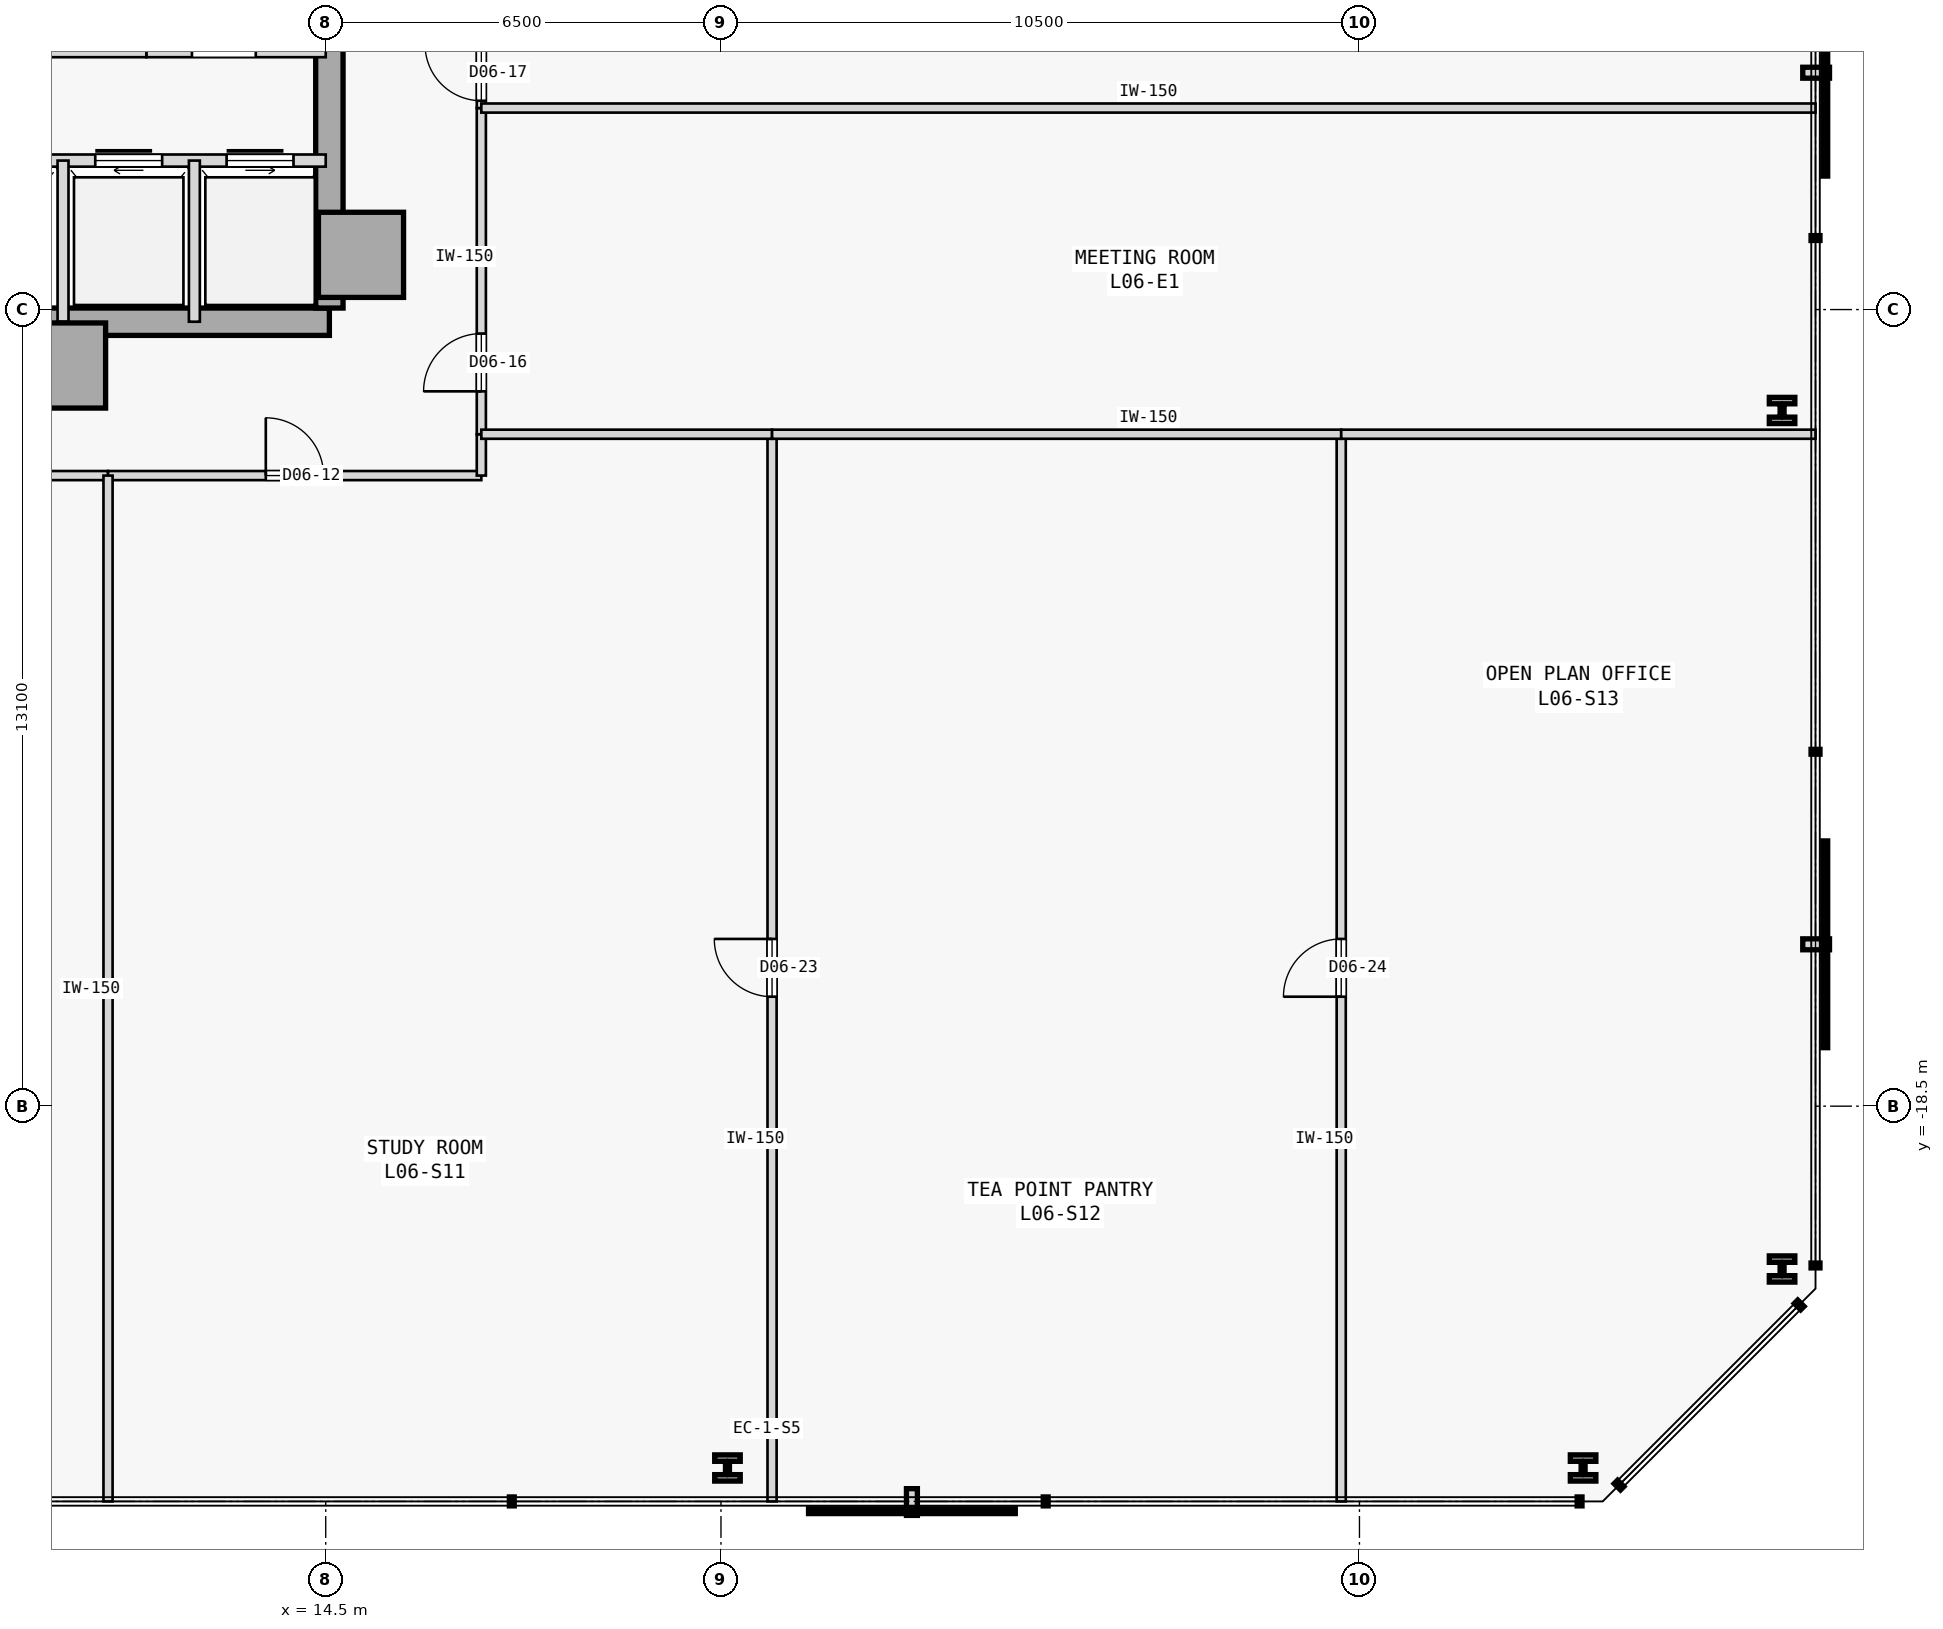
"""IFC4 building model, lengths in metres.
Left out: names, types, materials, properties, quantities, classifications, styles, units other than length and angle.
Written with IfcOpenShell. Run it as: python <this file> out.ifc"""

import sys

from ifc_helpers import new_model, si_unit, direction, frame, frame_2d, origin, origin_2d, place, context, subcontext, project, spatial, rectangle, i_section, extrude, element, fill, save


model = new_model("IFC4")
c1 = context("Model", 3, precision=1e-05, world=origin(), true_north=direction((0.0, 1.0)))
c2 = subcontext(c1, "Body", "Model", "MODEL_VIEW")
j1 = project(units=[si_unit("LENGTHUNIT", "METRE"), si_unit("PLANEANGLEUNIT", "RADIAN")], contexts=[c1])
p1 = place(None, origin())
s1 = spatial("IfcSite", under=j1, at=p1, CompositionType="ELEMENT")
p2 = place(p1, origin())
s2 = spatial("IfcBuilding", under=s1, at=p2, CompositionType="ELEMENT")
p3 = place(p2, frame((0.0, 0.0, 29.4)))
s3 = spatial("IfcBuildingStorey", under=s2, at=p3, CompositionType="ELEMENT", Elevation=29.4)
for number, where, z_axis, x_axis in (
    (1, (15.08, -4.5, 0.0), (0.0, 0.0, 1.0), (1.0, 0.0, 0.0)),
    (2, (10.18, -6.32, 0.0), (0.0, 0.0, 1.0), (1.0, 0.0, 0.0)),
):
    element("IfcColumn", number, at=place(p3, frame(where, z_axis=z_axis, x_axis=x_axis)), inside=s3, PredefinedType="COLUMN", context=c2, shape_type="SweptSolid", body=[
        extrude(rectangle(XDim=1.4, YDim=1.4, at=origin_2d()), origin(), (0.0, 0.0, 1.0), 3.8),
    ])
p4 = place(p3, frame((3.7, -5.6, 0.0), z_axis=(0.0, 0.0, 1.0), x_axis=(1.0, 0.0, 0.0)))
e3 = element("IfcWall", 3, at=p4, inside=s3, PredefinedType="SHEAR", context=c2, shape_type="SweptSolid", body=[
    extrude(rectangle(XDim=10.86, YDim=0.45, at=frame_2d((5.43, 0.0))), origin(), (0.0, 0.0, 1.0), 3.575),
])
p5 = place(p3, frame((14.56, -5.375, 0.0), z_axis=(0.0, 0.0, 1.0), x_axis=(0.0, 1.0, 0.0)))
e4 = element("IfcWall", 4, at=p5, inside=s3, PredefinedType="SHEAR", context=c2, shape_type="SweptSolid", body=[
    extrude(rectangle(XDim=10.75, YDim=0.45, at=frame_2d((5.375, 0.0))), origin(), (0.0, 0.0, 1.0), 3.575),
])
for number, where, z_axis, x_axis in (
    (5, (21.107, -24.45, 0.0), (0.0, 0.0, 1.0), (1.0, 0.0, 0.0)),
    (6, (35.178, -24.45, 0.0), (0.0, 0.0, 1.0), (1.0, 0.0, 0.0)),
    (7, (38.45, -21.178, 0.0), (0.0, 0.0, 1.0), (1.0, 0.0, 0.0)),
    (8, (38.45, -7.059, 0.0), (0.0, 0.0, 1.0), (1.0, 0.0, 0.0)),
):
    element("IfcColumn", number, at=place(p3, frame(where, z_axis=z_axis, x_axis=x_axis)), inside=s3, PredefinedType="COLUMN", context=c2, shape_type="SweptSolid", body=[
        extrude(i_section(OverallWidth=0.42, OverallDepth=0.431, WebThickness=0.065, FlangeThickness=0.106, FilletRadius=0.015, at=origin_2d()), origin(), (0.0, 0.0, 1.0), 3.8),
    ])
p6 = place(p3, frame((11.55, -1.15, 0.0), z_axis=(0.0, 0.0, 1.0), x_axis=(1.0, 0.0, 0.0)))
e9 = element("IfcWall", 9, at=p6, inside=s3, PredefinedType="STANDARD", context=c2, shape_type="SweptSolid", body=[
    extrude(rectangle(XDim=2.95, YDim=0.2, at=frame_2d((1.475, 0.0))), origin(), (0.0, 0.0, 1.0), 3.575),
])
p7 = place(p6, frame((0.75, 0.0, 0.0)))
e10 = element("IfcOpeningElement", 10, at=p7, cuts=e9, PredefinedType="OPENING", context=c2, shape_type="SweptSolid", body=[
    extrude(rectangle(XDim=1.05, YDim=2.18, at=frame_2d((0.525, 1.09))), frame((0.0, 0.11, 0.0), z_axis=(0.0, -1.0, 0.0), x_axis=(1.0, 0.0, 0.0)), (0.0, 0.0, 1.0), 0.22),
])
p8 = place(p3, frame((9.35, -1.15, 0.0), z_axis=(0.0, 0.0, 1.0), x_axis=(1.0, 0.0, 0.0)))
e11 = element("IfcWall", 11, at=p8, inside=s3, PredefinedType="STANDARD", context=c2, shape_type="SweptSolid", body=[
    extrude(rectangle(XDim=2.2, YDim=0.2, at=frame_2d((1.1, 0.0))), origin(), (0.0, 0.0, 1.0), 3.575),
])
p9 = place(p3, frame((3.7, -2.95, 0.0), z_axis=(0.0, 0.0, 1.0), x_axis=(1.0, 0.0, 0.0)))
e12 = element("IfcWall", 12, at=p9, inside=s3, PredefinedType="STANDARD", context=c2, shape_type="SweptSolid", body=[
    extrude(rectangle(XDim=10.8, YDim=0.2, at=frame_2d((5.4, 0.0))), origin(), (0.0, 0.0, 1.0), 3.575),
])
p10 = place(p9, frame((7.01, 0.0, 0.0)))
e13 = element("IfcOpeningElement", 13, at=p10, cuts=e12, PredefinedType="OPENING", context=c2, shape_type="SweptSolid", body=[
    extrude(rectangle(XDim=1.1, YDim=2.15, at=frame_2d((0.55, 1.075))), frame((0.0, 0.11, 0.0), z_axis=(0.0, -1.0, 0.0), x_axis=(1.0, 0.0, 0.0)), (0.0, 0.0, 1.0), 0.22),
])
p11 = place(p9, frame((9.17, 0.0, 0.0)))
e14 = element("IfcOpeningElement", 14, at=p11, cuts=e12, PredefinedType="OPENING", context=c2, shape_type="SweptSolid", body=[
    extrude(rectangle(XDim=1.1, YDim=2.15, at=frame_2d((0.55, 1.075))), frame((0.0, 0.11, 0.0), z_axis=(0.0, -1.0, 0.0), x_axis=(1.0, 0.0, 0.0)), (0.0, 0.0, 1.0), 0.22),
])
for number, where, z_axis, x_axis in (
    (15, (12.34, -5.6, 0.0), (0.0, 0.0, 1.0), (0.0, 1.0, 0.0)),
    (16, (10.18, -5.6, 0.0), (0.0, 0.0, 1.0), (0.0, 1.0, 0.0)),
):
    element("IfcWall", number, at=place(p3, frame(where, z_axis=z_axis, x_axis=x_axis)), inside=s3, PredefinedType="STANDARD", context=c2, shape_type="SweptSolid", body=[
        extrude(rectangle(XDim=2.65, YDim=0.18, at=frame_2d((1.325, 0.0))), origin(), (0.0, 0.0, 1.0), 3.575),
    ])
p12 = place(p3, frame((0.92, -8.13, 0.0), z_axis=(0.0, 0.0, 1.0), x_axis=(1.0, 0.0, 0.0)))
e17 = element("IfcWall", 17, at=p12, inside=s3, PredefinedType="PARTITIONING", context=c2, shape_type="SweptSolid", body=[
    extrude(rectangle(XDim=10.0, YDim=0.15, at=frame_2d((5.0, 0.0))), origin(), (0.0, 0.0, 1.0), 3.575),
])
p13 = place(p3, frame((10.92, -8.13, 0.0), z_axis=(0.0, 0.0, 1.0), x_axis=(1.0, 0.0, 0.0)))
e18 = element("IfcWall", 18, at=p13, inside=s3, PredefinedType="PARTITIONING", context=c2, shape_type="SweptSolid", body=[
    extrude(rectangle(XDim=6.139, YDim=0.15, at=frame_2d((3.07, 0.0))), origin(), (0.0, 0.0, 1.0), 3.575),
])
p14 = place(p13, frame((2.594, 0.0, 0.0)))
e19 = element("IfcOpeningElement", 19, at=p14, cuts=e18, PredefinedType="OPENING", context=c2, shape_type="SweptSolid", body=[
    extrude(rectangle(XDim=0.95, YDim=2.15, at=frame_2d((0.475, 1.075))), frame((0.0, 0.085, 0.0), z_axis=(0.0, -1.0, 0.0), x_axis=(1.0, 0.0, 0.0)), (0.0, 0.0, 1.0), 0.17),
])
p15 = place(p3, frame((17.059, -8.13, 0.0), z_axis=(0.0, 0.0, 1.0), x_axis=(0.0, 1.0, 0.0)))
e20 = element("IfcWall", 20, at=p15, inside=s3, PredefinedType="PARTITIONING", context=c2, shape_type="SweptSolid", body=[
    extrude(rectangle(XDim=0.68, YDim=0.15, at=frame_2d((0.34, 0.0))), origin(), (0.0, 0.0, 1.0), 3.575),
])
p16 = place(p3, frame((17.059, -7.45, 0.0), z_axis=(0.0, 0.0, 1.0), x_axis=(0.0, 1.0, 0.0)))
e21 = element("IfcWall", 21, at=p16, inside=s3, PredefinedType="PARTITIONING", context=c2, shape_type="SweptSolid", body=[
    extrude(rectangle(XDim=5.364, YDim=0.15, at=frame_2d((2.682, 0.0))), origin(), (0.0, 0.0, 1.0), 3.575),
])
p17 = place(p16, frame((0.705, 0.0, 0.0)))
e22 = element("IfcOpeningElement", 22, at=p17, cuts=e21, PredefinedType="OPENING", context=c2, shape_type="SweptSolid", body=[
    extrude(rectangle(XDim=0.95, YDim=2.15, at=frame_2d((0.475, 1.075))), frame((0.0, 0.085, 0.0), z_axis=(0.0, -1.0, 0.0), x_axis=(1.0, 0.0, 0.0)), (0.0, 0.0, 1.0), 0.17),
])
p18 = place(p3, frame((17.059, -2.086, 0.0), z_axis=(0.0, 0.0, 1.0), x_axis=(0.0, 1.0, 0.0)))
e23 = element("IfcWall", 23, at=p18, inside=s3, PredefinedType="PARTITIONING", context=c2, shape_type="SweptSolid", body=[
    extrude(rectangle(XDim=1.166, YDim=0.15, at=frame_2d((0.583, 0.0))), origin(), (0.0, 0.0, 1.0), 3.575),
])
p19 = place(p18, frame((0.12, 0.0, 0.0)))
e24 = element("IfcOpeningElement", 24, at=p19, cuts=e23, PredefinedType="OPENING", context=c2, shape_type="SweptSolid", body=[
    extrude(rectangle(XDim=0.926, YDim=2.15, at=frame_2d((0.463, 1.075))), frame((0.0, 0.085, 0.0), z_axis=(0.0, -1.0, 0.0), x_axis=(1.0, 0.0, 0.0)), (0.0, 0.0, 1.0), 0.17),
])
p20 = place(p3, frame((10.92, -25.0, 0.0), z_axis=(0.0, 0.0, 1.0), x_axis=(0.0, 1.0, 0.0)))
e25 = element("IfcWall", 25, at=p20, inside=s3, PredefinedType="PARTITIONING", context=c2, shape_type="SweptSolid", body=[
    extrude(rectangle(XDim=16.87, YDim=0.15, at=frame_2d((8.435, 0.0))), origin(), (0.0, 0.0, 1.0), 3.575),
])
p21 = place(p3, frame((21.84, -25.0, 0.0), z_axis=(0.0, 0.0, 1.0), x_axis=(0.0, 1.0, 0.0)))
e26 = element("IfcWall", 26, at=p21, inside=s3, PredefinedType="PARTITIONING", context=c2, shape_type="SweptSolid", body=[
    extrude(rectangle(XDim=17.55, YDim=0.15, at=frame_2d((8.775, 0.0))), origin(), (0.0, 0.0, 1.0), 3.575),
])
p22 = place(p21, frame((8.3, 0.0, 0.0)))
e27 = element("IfcOpeningElement", 27, at=p22, cuts=e26, PredefinedType="OPENING", context=c2, shape_type="SweptSolid", body=[
    extrude(rectangle(XDim=0.95, YDim=2.15, at=frame_2d((0.475, 1.075))), frame((0.0, 0.085, 0.0), z_axis=(0.0, -1.0, 0.0), x_axis=(1.0, 0.0, 0.0)), (0.0, 0.0, 1.0), 0.17),
])
p23 = place(p3, frame((17.059, -7.45, 0.0), z_axis=(0.0, 0.0, 1.0), x_axis=(1.0, 0.0, 0.0)))
e28 = element("IfcWall", 28, at=p23, inside=s3, PredefinedType="PARTITIONING", context=c2, shape_type="SweptSolid", body=[
    extrude(rectangle(XDim=4.781, YDim=0.15, at=frame_2d((2.391, 0.0))), origin(), (0.0, 0.0, 1.0), 3.575),
])
p24 = place(p3, frame((31.2, -25.0, 0.0), z_axis=(0.0, 0.0, 1.0), x_axis=(0.0, 1.0, 0.0)))
e29 = element("IfcWall", 29, at=p24, inside=s3, PredefinedType="PARTITIONING", context=c2, shape_type="SweptSolid", body=[
    extrude(rectangle(XDim=17.55, YDim=0.15, at=frame_2d((8.775, 0.0))), origin(), (0.0, 0.0, 1.0), 3.575),
])
p25 = place(p24, frame((8.3, 0.0, 0.0)))
e30 = element("IfcOpeningElement", 30, at=p25, cuts=e29, PredefinedType="OPENING", context=c2, shape_type="SweptSolid", body=[
    extrude(rectangle(XDim=0.95, YDim=2.15, at=frame_2d((0.475, 1.075))), frame((0.0, 0.085, 0.0), z_axis=(0.0, -1.0, 0.0), x_axis=(1.0, 0.0, 0.0)), (0.0, 0.0, 1.0), 0.17),
])
p26 = place(p3, frame((21.84, -7.45, 0.0), z_axis=(0.0, 0.0, 1.0), x_axis=(1.0, 0.0, 0.0)))
e31 = element("IfcWall", 31, at=p26, inside=s3, PredefinedType="PARTITIONING", context=c2, shape_type="SweptSolid", body=[
    extrude(rectangle(XDim=9.36, YDim=0.15, at=frame_2d((4.68, 0.0))), origin(), (0.0, 0.0, 1.0), 3.575),
])
p27 = place(p3, frame((31.2, -7.45, 0.0), z_axis=(0.0, 0.0, 1.0), x_axis=(1.0, 0.0, 0.0)))
e32 = element("IfcWall", 32, at=p27, inside=s3, PredefinedType="PARTITIONING", context=c2, shape_type="SweptSolid", body=[
    extrude(rectangle(XDim=7.8, YDim=0.15, at=frame_2d((3.9, 0.0))), origin(), (0.0, 0.0, 1.0), 3.575),
])
p28 = place(p3, frame((17.059, -2.086, 0.0), z_axis=(0.0, 0.0, 1.0), x_axis=(1.0, 0.0, 0.0)))
e33 = element("IfcWall", 33, at=p28, inside=s3, PredefinedType="PARTITIONING", context=c2, shape_type="SweptSolid", body=[
    extrude(rectangle(XDim=21.941, YDim=0.15, at=frame_2d((10.97, 0.0))), origin(), (0.0, 0.0, 1.0), 3.575),
])
p29 = place(p7, origin())
e34 = element("IfcDoor", 34, at=p29, inside=s3, OperationType="SINGLE_SWING_LEFT", PredefinedType="DOOR", context=c2, shape_type="SweptSolid", body=[
    extrude(rectangle(XDim=1.05, YDim=2.18, at=frame_2d((0.525, 1.09))), frame((0.0, 0.025, 0.0), z_axis=(0.0, -1.0, 0.0), x_axis=(1.0, 0.0, 0.0)), (0.0, 0.0, 1.0), 0.05),
])
fill(e10, e34)
p30 = place(p10, origin())
e35 = element("IfcDoor", 35, at=p30, inside=s3, OperationType="SLIDING_TO_RIGHT", PredefinedType="DOOR", context=c2, shape_type="SweptSolid", body=[
    extrude(rectangle(XDim=1.1, YDim=2.15, at=frame_2d((0.55, 1.075))), frame((0.0, 0.025, 0.0), z_axis=(0.0, -1.0, 0.0), x_axis=(1.0, 0.0, 0.0)), (0.0, 0.0, 1.0), 0.05),
])
fill(e13, e35)
p31 = place(p11, origin())
e36 = element("IfcDoor", 36, at=p31, inside=s3, OperationType="SLIDING_TO_LEFT", PredefinedType="DOOR", context=c2, shape_type="SweptSolid", body=[
    extrude(rectangle(XDim=1.1, YDim=2.15, at=frame_2d((0.55, 1.075))), frame((0.0, 0.025, 0.0), z_axis=(0.0, -1.0, 0.0), x_axis=(1.0, 0.0, 0.0)), (0.0, 0.0, 1.0), 0.05),
])
fill(e14, e36)
p32 = place(p14, origin())
e37 = element("IfcDoor", 37, at=p32, inside=s3, OperationType="SINGLE_SWING_LEFT", PredefinedType="DOOR", context=c2, shape_type="SweptSolid", body=[
    extrude(rectangle(XDim=0.95, YDim=2.15, at=frame_2d((0.475, 1.075))), frame((0.0, 0.025, 0.0), z_axis=(0.0, -1.0, 0.0), x_axis=(1.0, 0.0, 0.0)), (0.0, 0.0, 1.0), 0.05),
])
fill(e19, e37)
p33 = place(p17, origin())
e38 = element("IfcDoor", 38, at=p33, inside=s3, OperationType="SINGLE_SWING_LEFT", PredefinedType="DOOR", context=c2, shape_type="SweptSolid", body=[
    extrude(rectangle(XDim=0.95, YDim=2.15, at=frame_2d((0.475, 1.075))), frame((0.0, 0.025, 0.0), z_axis=(0.0, -1.0, 0.0), x_axis=(1.0, 0.0, 0.0)), (0.0, 0.0, 1.0), 0.05),
])
fill(e22, e38)
p34 = place(p19, origin())
e39 = element("IfcDoor", 39, at=p34, inside=s3, OperationType="SINGLE_SWING_RIGHT", PredefinedType="DOOR", context=c2, shape_type="SweptSolid", body=[
    extrude(rectangle(XDim=0.926, YDim=2.15, at=frame_2d((0.463, 1.075))), frame((0.0, 0.025, 0.0), z_axis=(0.0, -1.0, 0.0), x_axis=(1.0, 0.0, 0.0)), (0.0, 0.0, 1.0), 0.05),
])
fill(e24, e39)
p35 = place(p22, origin())
e40 = element("IfcDoor", 40, at=p35, inside=s3, OperationType="SINGLE_SWING_RIGHT", PredefinedType="DOOR", context=c2, shape_type="SweptSolid", body=[
    extrude(rectangle(XDim=0.95, YDim=2.15, at=frame_2d((0.475, 1.075))), frame((0.0, 0.025, 0.0), z_axis=(0.0, -1.0, 0.0), x_axis=(1.0, 0.0, 0.0)), (0.0, 0.0, 1.0), 0.05),
])
fill(e27, e40)
p36 = place(p25, origin())
e41 = element("IfcDoor", 41, at=p36, inside=s3, OperationType="SINGLE_SWING_LEFT", PredefinedType="DOOR", context=c2, shape_type="SweptSolid", body=[
    extrude(rectangle(XDim=0.95, YDim=2.15, at=frame_2d((0.475, 1.075))), frame((0.0, 0.025, 0.0), z_axis=(0.0, -1.0, 0.0), x_axis=(1.0, 0.0, 0.0)), (0.0, 0.0, 1.0), 0.05),
])
fill(e30, e41)
save(model, sys.argv[1])
